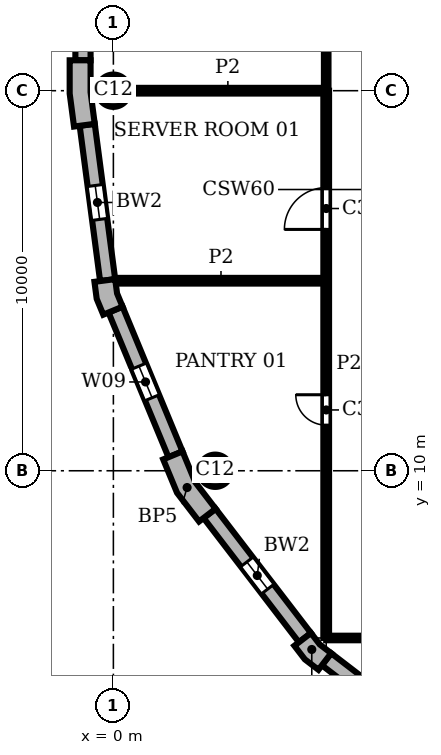
"""IFC4 building model, lengths in metres.
Left out: names, types, materials, properties, quantities, classifications, styles, units other than length and angle.
Written with IfcOpenShell. Run it as: python <this file> out.ifc"""

import sys

from ifc_helpers import new_model, si_unit, direction, frame, frame_2d, origin, origin_2d, place, context, subcontext, project, spatial, polyline, rectangle, circle, outline, extrude, element, fill, save


model = new_model("IFC4")
c1 = context("Model", 3, precision=1e-05, world=origin(), true_north=direction((0.0, 1.0)))
c2 = subcontext(c1, "Body", "Model", "MODEL_VIEW")
j1 = project(units=[si_unit("LENGTHUNIT", "METRE"), si_unit("PLANEANGLEUNIT", "RADIAN")], contexts=[c1])
p1 = place(None, origin())
s1 = spatial("IfcSite", under=j1, at=p1, CompositionType="ELEMENT")
p2 = place(p1, origin())
s2 = spatial("IfcBuilding", under=s1, at=p2, CompositionType="ELEMENT")
p3 = place(p2, frame((0.0, 0.0, 274.8)))
s3 = spatial("IfcBuildingStorey", under=s2, at=p3, CompositionType="ELEMENT", Elevation=274.8)
for number, where, z_axis, x_axis in (
    (1, (0.0, 20.0, 0.0), (0.0, 0.0, 1.0), (1.0, 0.0, 0.0)),
    (2, (2.679, 10.0, 0.0), (0.0, 0.0, 1.0), (1.0, 0.0, 0.0)),
):
    element("IfcColumn", number, at=place(p3, frame(where, z_axis=z_axis, x_axis=x_axis)), inside=s3, PredefinedType="COLUMN", context=c2, shape_type="SweptSolid", body=[
        extrude(circle(Radius=0.425, at=origin_2d()), origin(), (0.0, 0.0, 1.0), 3.9),
    ])
p4 = place(p3, origin())
e3 = element("IfcWall", 3, at=p4, inside=s3, PredefinedType="SOLIDWALL", context=c2, shape_type="SweptSolid", body=[
    extrude(outline(polyline([(-1.0, 20.8), (-1.15, 20.8), (-1.15, 19.925), (-1.036, 19.057), (-0.887, 19.076), (-0.49, 19.128), (-0.6, 19.961), (-0.6, 20.8), (-1.0, 20.8)])), origin(), (0.0, 0.0, 1.0), 3.9),
])
e4 = element("IfcWall", 4, at=p4, inside=s3, PredefinedType="SOLIDWALL", context=c2, shape_type="SweptSolid", body=[
    extrude(outline(polyline([(-0.349, 14.99), (-0.498, 14.971), (-0.439, 14.523), (-0.266, 14.106), (-0.128, 14.164), (0.242, 14.317), (0.097, 14.667), (0.047, 15.043), (-0.349, 14.99)])), origin(), (0.0, 0.0, 1.0), 3.9),
])
e5 = element("IfcWall", 5, at=p4, inside=s3, PredefinedType="SOLIDWALL", context=c2, shape_type="SweptSolid", body=[
    extrude(outline(polyline([(1.449, 10.356), (1.311, 10.299), (1.675, 9.42), (2.254, 8.665), (2.373, 8.757), (2.69, 9.0), (2.155, 9.698), (1.819, 10.51), (1.449, 10.356)])), origin(), (0.0, 0.0, 1.0), 3.9),
])
e6 = element("IfcWall", 6, at=p4, inside=s3, PredefinedType="SOLIDWALL", context=c2, shape_type="SweptSolid", body=[
    extrude(outline(polyline([(4.882, 5.487), (4.763, 5.396), (5.038, 5.038), (5.396, 4.763), (5.487, 4.882), (5.731, 5.199), (5.43, 5.43), (5.199, 5.731), (4.882, 5.487)])), origin(), (0.0, 0.0, 1.0), 3.9),
])
p5 = place(p3, frame((-0.8, 39.2, 0.0), z_axis=(0.0, 0.0, 1.0), x_axis=(0.0, -1.0, 0.0)))
e7 = element("IfcWall", 7, at=p5, inside=s3, PredefinedType="SOLIDWALL", context=c2, shape_type="SweptSolid", body=[
    extrude(rectangle(XDim=18.4, YDim=0.4, at=frame_2d((9.2, 0.0))), origin(), (0.0, 0.0, 1.0), 3.9),
])
p6 = place(p5, frame((3.75, 0.0, 0.9)))
e8 = element("IfcOpeningElement", 8, at=p6, cuts=e7, PredefinedType="OPENING", context=c2, shape_type="SweptSolid", body=[
    extrude(rectangle(XDim=0.9, YDim=2.35, at=frame_2d((0.45, 1.175))), frame((0.0, 0.21, 0.0), z_axis=(0.0, -1.0, 0.0), x_axis=(1.0, 0.0, 0.0)), (0.0, 0.0, 1.0), 0.42),
])
p7 = place(p5, frame((13.75, 0.0, 0.9)))
e9 = element("IfcOpeningElement", 9, at=p7, cuts=e7, PredefinedType="OPENING", context=c2, shape_type="SweptSolid", body=[
    extrude(rectangle(XDim=0.9, YDim=2.35, at=frame_2d((0.45, 1.175))), frame((0.0, 0.21, 0.0), z_axis=(0.0, -1.0, 0.0), x_axis=(1.0, 0.0, 0.0)), (0.0, 0.0, 1.0), 0.42),
])
p8 = place(p3, frame((-0.689, 19.102, 0.0), z_axis=(0.0, 0.0, 1.0), x_axis=(0.130514280502, -0.991446429508, 0.0)))
e10 = element("IfcWall", 10, at=p8, inside=s3, PredefinedType="SOLIDWALL", context=c2, shape_type="SweptSolid", body=[
    extrude(rectangle(XDim=4.121, YDim=0.4, at=frame_2d((2.061, 0.0))), origin(), (0.0, 0.0, 1.0), 3.9),
])
p9 = place(p8, frame((1.611, 0.0, 0.9)))
e11 = element("IfcOpeningElement", 11, at=p9, cuts=e10, PredefinedType="OPENING", context=c2, shape_type="SweptSolid", body=[
    extrude(rectangle(XDim=0.9, YDim=2.35, at=frame_2d((0.45, 1.175))), frame((0.0, 0.21, 0.0), z_axis=(0.0, -1.0, 0.0), x_axis=(1.0, 0.0, 0.0)), (0.0, 0.0, 1.0), 0.42),
])
p10 = place(p3, frame((0.057, 14.24, 0.0), z_axis=(0.0, 0.0, 1.0), x_axis=(0.382721546029, -0.923863744394, 0.0)))
e12 = element("IfcWall", 12, at=p10, inside=s3, PredefinedType="SOLIDWALL", context=c2, shape_type="SweptSolid", body=[
    extrude(rectangle(XDim=4.121, YDim=0.4, at=frame_2d((2.061, 0.0))), origin(), (0.0, 0.0, 1.0), 3.9),
])
p11 = place(p10, frame((1.611, 0.0, 0.9)))
e13 = element("IfcOpeningElement", 13, at=p11, cuts=e12, PredefinedType="OPENING", context=c2, shape_type="SweptSolid", body=[
    extrude(rectangle(XDim=0.9, YDim=2.35, at=frame_2d((0.45, 1.175))), frame((0.0, 0.21, 0.0), z_axis=(0.0, -1.0, 0.0), x_axis=(1.0, 0.0, 0.0)), (0.0, 0.0, 1.0), 0.42),
])
p12 = place(p3, frame((2.532, 8.878, 0.0), z_axis=(0.0, 0.0, 1.0), x_axis=(0.608759824817, -0.793354571229, 0.0)))
e14 = element("IfcWall", 14, at=p12, inside=s3, PredefinedType="SOLIDWALL", context=c2, shape_type="SweptSolid", body=[
    extrude(rectangle(XDim=4.121, YDim=0.4, at=frame_2d((2.061, 0.0))), origin(), (0.0, 0.0, 1.0), 3.9),
])
p13 = place(p12, frame((1.611, 0.0, 0.9)))
e15 = element("IfcOpeningElement", 15, at=p13, cuts=e14, PredefinedType="OPENING", context=c2, shape_type="SweptSolid", body=[
    extrude(rectangle(XDim=0.9, YDim=2.35, at=frame_2d((0.45, 1.175))), frame((0.0, 0.21, 0.0), z_axis=(0.0, -1.0, 0.0), x_axis=(1.0, 0.0, 0.0)), (0.0, 0.0, 1.0), 0.42),
])
p14 = place(p3, frame((5.609, 5.041, 0.0), z_axis=(0.0, 0.0, 1.0), x_axis=(0.793354571229, -0.608759824817, 0.0)))
e16 = element("IfcWall", 16, at=p14, inside=s3, PredefinedType="SOLIDWALL", context=c2, shape_type="SweptSolid", body=[
    extrude(rectangle(XDim=4.121, YDim=0.4, at=frame_2d((2.061, 0.0))), origin(), (0.0, 0.0, 1.0), 3.9),
])
p15 = place(p14, frame((1.611, 0.0, 0.9)))
e17 = element("IfcOpeningElement", 17, at=p15, cuts=e16, PredefinedType="OPENING", context=c2, shape_type="SweptSolid", body=[
    extrude(rectangle(XDim=0.9, YDim=2.35, at=frame_2d((0.45, 1.175))), frame((0.0, 0.21, 0.0), z_axis=(0.0, -1.0, 0.0), x_axis=(1.0, 0.0, 0.0)), (0.0, 0.0, 1.0), 0.42),
])
p16 = place(p3, frame((5.6, 5.6, 0.0), z_axis=(0.0, 0.0, 1.0), x_axis=(0.0, 1.0, 0.0)))
e18 = element("IfcWall", 18, at=p16, inside=s3, PredefinedType="PARTITIONING", context=c2, shape_type="SweptSolid", body=[
    extrude(rectangle(XDim=14.4, YDim=0.15, at=frame_2d((7.2, 0.0))), origin(), (0.0, 0.0, 1.0), 3.58),
])
p17 = place(p16, frame((5.6, 0.0, 0.0)))
e19 = element("IfcOpeningElement", 19, at=p17, cuts=e18, PredefinedType="OPENING", context=c2, shape_type="SweptSolid", body=[
    extrude(rectangle(XDim=0.8, YDim=2.1, at=frame_2d((0.4, 1.05))), frame((0.0, 0.085, 0.0), z_axis=(0.0, -1.0, 0.0), x_axis=(1.0, 0.0, 0.0)), (0.0, 0.0, 1.0), 0.17),
])
p18 = place(p16, frame((10.75, 0.0, 0.0)))
e20 = element("IfcOpeningElement", 20, at=p18, cuts=e18, PredefinedType="OPENING", context=c2, shape_type="SweptSolid", body=[
    extrude(rectangle(XDim=1.1, YDim=2.1, at=frame_2d((0.55, 1.05))), frame((0.0, 0.085, 0.0), z_axis=(0.0, -1.0, 0.0), x_axis=(1.0, 0.0, 0.0)), (0.0, 0.0, 1.0), 0.17),
])
p19 = place(p3, frame((0.063, 15.0, 0.0), z_axis=(0.0, 0.0, 1.0), x_axis=(1.0, 0.0, 0.0)))
e21 = element("IfcWall", 21, at=p19, inside=s3, PredefinedType="PARTITIONING", context=c2, shape_type="SweptSolid", body=[
    extrude(rectangle(XDim=5.537, YDim=0.15, at=frame_2d((2.769, 0.0))), origin(), (0.0, 0.0, 1.0), 3.58),
])
p20 = place(p3, frame((0.425, 20.0, 0.0), z_axis=(0.0, 0.0, 1.0), x_axis=(1.0, 0.0, 0.0)))
e22 = element("IfcWall", 22, at=p20, inside=s3, PredefinedType="PARTITIONING", context=c2, shape_type="SweptSolid", body=[
    extrude(rectangle(XDim=5.175, YDim=0.15, at=frame_2d((2.587, 0.0))), origin(), (0.0, 0.0, 1.0), 3.58),
])
p21 = place(p3, frame((5.6, 20.0, 0.0), z_axis=(0.0, 0.0, 1.0), x_axis=(0.0, 1.0, 0.0)))
e23 = element("IfcWall", 23, at=p21, inside=s3, PredefinedType="PARTITIONING", context=c2, shape_type="SweptSolid", body=[
    extrude(rectangle(XDim=8.0, YDim=0.12, at=frame_2d((4.0, 0.0))), origin(), (0.0, 0.0, 1.0), 3.58),
])
p22 = place(p3, frame((5.6, 5.6, 0.0), z_axis=(0.0, 0.0, 1.0), x_axis=(1.0, 0.0, 0.0)))
e24 = element("IfcWall", 24, at=p22, inside=s3, PredefinedType="PARTITIONING", context=c2, shape_type="SweptSolid", body=[
    extrude(rectangle(XDim=25.4, YDim=0.12, at=frame_2d((12.7, 0.0))), origin(), (0.0, 0.0, 1.0), 3.58),
])
p23 = place(p22, frame((13.35, 0.0, 0.0)))
e25 = element("IfcOpeningElement", 25, at=p23, cuts=e24, PredefinedType="OPENING", context=c2, shape_type="SweptSolid", body=[
    extrude(rectangle(XDim=1.8, YDim=2.1, at=frame_2d((0.9, 1.05))), frame((0.0, 0.07, 0.0), z_axis=(0.0, -1.0, 0.0), x_axis=(1.0, 0.0, 0.0)), (0.0, 0.0, 1.0), 0.14),
])
p24 = place(p9, origin())
e26 = element("IfcWindow", 26, at=p24, inside=s3, PartitioningType="SINGLE_PANEL", PredefinedType="WINDOW", context=c2, shape_type="SweptSolid", body=[
    extrude(rectangle(XDim=0.9, YDim=2.35, at=frame_2d((0.45, 1.175))), frame((0.0, 0.16, 0.0), z_axis=(0.0, -1.0, 0.0), x_axis=(1.0, 0.0, 0.0)), (0.0, 0.0, 1.0), 0.06),
])
fill(e11, e26)
p25 = place(p11, origin())
e27 = element("IfcWindow", 27, at=p25, inside=s3, PartitioningType="SINGLE_PANEL", PredefinedType="WINDOW", context=c2, shape_type="SweptSolid", body=[
    extrude(rectangle(XDim=0.9, YDim=2.35, at=frame_2d((0.45, 1.175))), frame((0.0, 0.16, 0.0), z_axis=(0.0, -1.0, 0.0), x_axis=(1.0, 0.0, 0.0)), (0.0, 0.0, 1.0), 0.06),
])
fill(e13, e27)
p26 = place(p13, origin())
e28 = element("IfcWindow", 28, at=p26, inside=s3, PartitioningType="SINGLE_PANEL", PredefinedType="WINDOW", context=c2, shape_type="SweptSolid", body=[
    extrude(rectangle(XDim=0.9, YDim=2.35, at=frame_2d((0.45, 1.175))), frame((0.0, 0.16, 0.0), z_axis=(0.0, -1.0, 0.0), x_axis=(1.0, 0.0, 0.0)), (0.0, 0.0, 1.0), 0.06),
])
fill(e15, e28)
p27 = place(p17, origin())
e29 = element("IfcDoor", 29, at=p27, inside=s3, OperationType="SINGLE_SWING_RIGHT", PredefinedType="DOOR", context=c2, shape_type="SweptSolid", body=[
    extrude(rectangle(XDim=0.8, YDim=2.1, at=frame_2d((0.4, 1.05))), frame((0.0, 0.025, 0.0), z_axis=(0.0, -1.0, 0.0), x_axis=(1.0, 0.0, 0.0)), (0.0, 0.0, 1.0), 0.05),
])
fill(e19, e29)
p28 = place(p18, origin())
e30 = element("IfcDoor", 30, at=p28, inside=s3, OperationType="SINGLE_SWING_LEFT", PredefinedType="DOOR", context=c2, shape_type="SweptSolid", body=[
    extrude(rectangle(XDim=1.1, YDim=2.1, at=frame_2d((0.55, 1.05))), frame((0.0, 0.025, 0.0), z_axis=(0.0, -1.0, 0.0), x_axis=(1.0, 0.0, 0.0)), (0.0, 0.0, 1.0), 0.05),
])
fill(e20, e30)
save(model, sys.argv[1])
